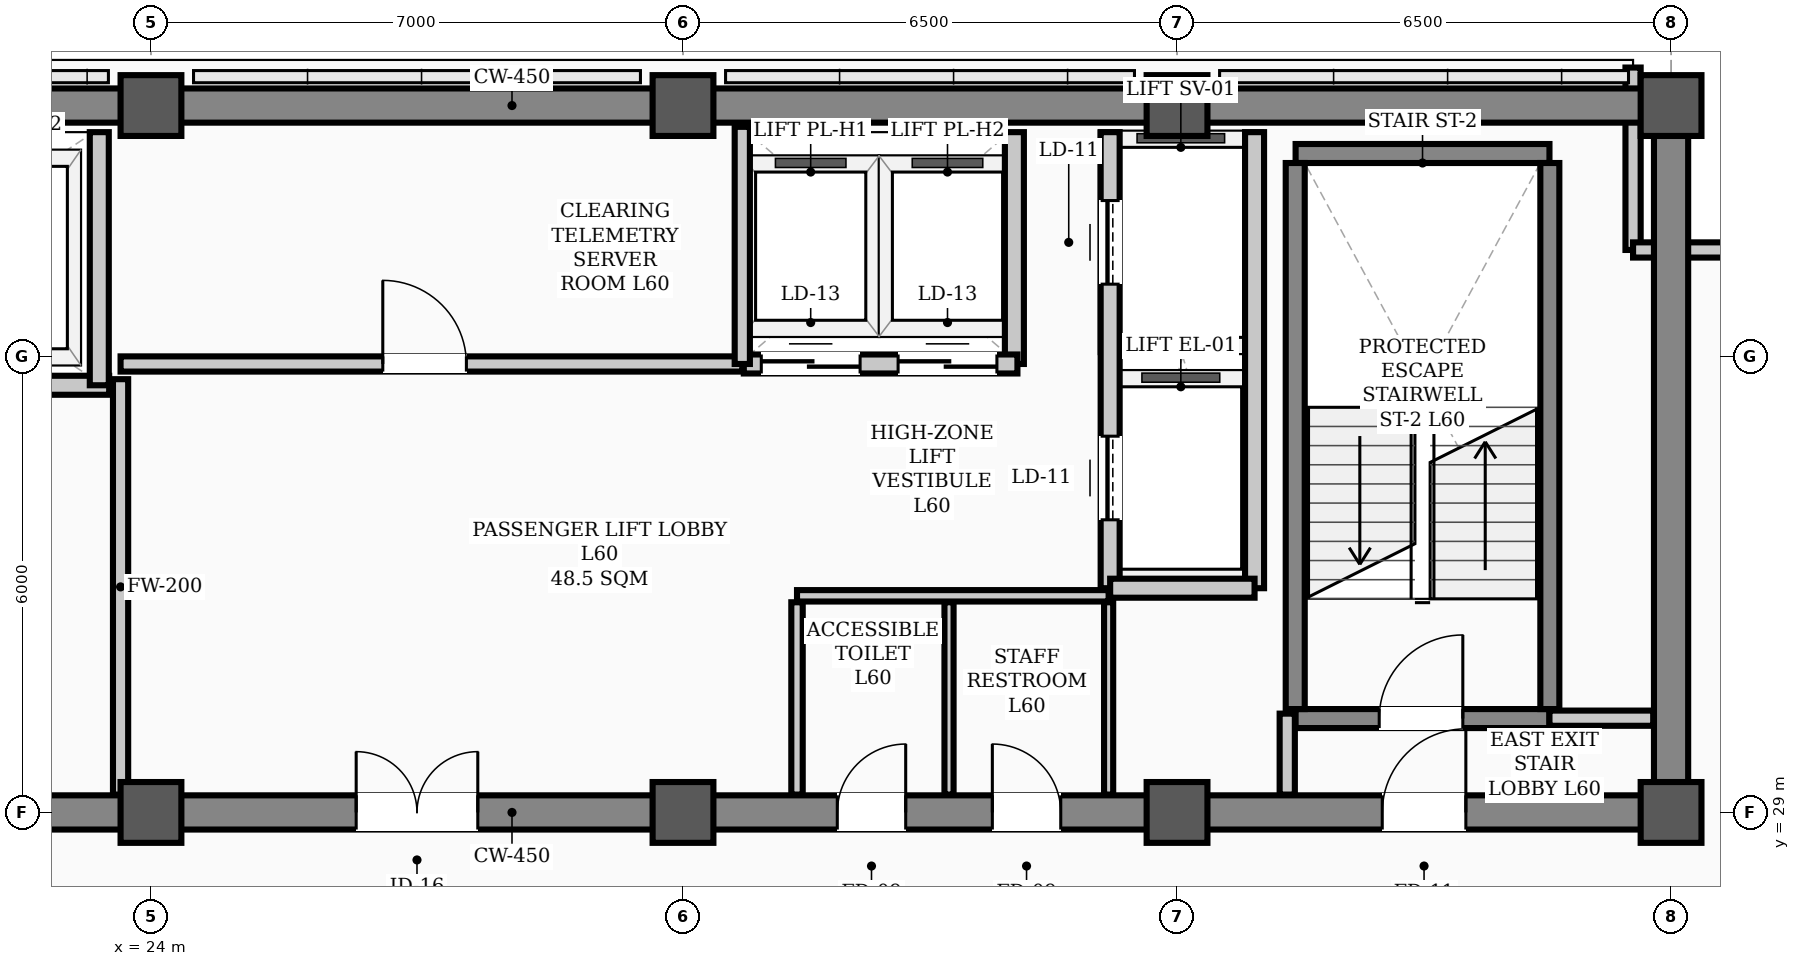
"""IFC4 building model, lengths in metres.
Left out: names, types, materials, properties, quantities, classifications, styles, units other than length and angle.
Written with IfcOpenShell. Run it as: python <this file> out.ifc"""

import sys

from ifc_helpers import new_model, si_unit, direction, frame, frame_2d, origin, origin_2d, place, context, subcontext, project, spatial, rectangle, hollow_rectangle, extrude, element, fill, save


model = new_model("IFC4")
c1 = context("Model", 3, precision=1e-05, world=origin(), true_north=direction((0.0, 1.0)))
c2 = subcontext(c1, "Body", "Model", "MODEL_VIEW")
j1 = project(units=[si_unit("LENGTHUNIT", "METRE"), si_unit("PLANEANGLEUNIT", "RADIAN")], contexts=[c1])
p1 = place(None, origin())
s1 = spatial("IfcSite", under=j1, at=p1, CompositionType="ELEMENT")
p2 = place(p1, origin())
s2 = spatial("IfcBuilding", under=s1, at=p2, CompositionType="ELEMENT")
p3 = place(p2, frame((0.0, 0.0, 242.3)))
s3 = spatial("IfcBuildingStorey", under=s2, at=p3, CompositionType="ELEMENT", Elevation=242.3)
for number, where, z_axis, x_axis in (
    (1, (24.0, 29.0, 0.0), (0.0, 0.0, 1.0), (1.0, 0.0, 0.0)),
    (2, (24.0, 38.3, 0.0), (0.0, 0.0, 1.0), (1.0, 0.0, 0.0)),
    (3, (31.0, 29.0, 0.0), (0.0, 0.0, 1.0), (1.0, 0.0, 0.0)),
    (4, (31.0, 38.3, 0.0), (0.0, 0.0, 1.0), (1.0, 0.0, 0.0)),
    (5, (37.5, 29.0, 0.0), (0.0, 0.0, 1.0), (1.0, 0.0, 0.0)),
    (6, (37.5, 38.3, 0.0), (0.0, 0.0, 1.0), (1.0, 0.0, 0.0)),
    (7, (44.0, 29.0, 0.0), (0.0, 0.0, 1.0), (1.0, 0.0, 0.0)),
    (8, (44.0, 38.3, 0.0), (0.0, 0.0, 1.0), (1.0, 0.0, 0.0)),
):
    element("IfcColumn", number, at=place(p3, frame(where, z_axis=z_axis, x_axis=x_axis)), inside=s3, PredefinedType="COLUMN", context=c2, shape_type="SweptSolid", body=[
        extrude(hollow_rectangle(XDim=0.8, YDim=0.8, WallThickness=0.032, InnerFilletRadius=0.016, OuterFilletRadius=0.048, at=origin_2d()), origin(), (0.0, 0.0, 1.0), 3.9),
    ])
p4 = place(p3, frame((43.5, 38.8, 0.0), z_axis=(0.0, 0.0, 1.0), x_axis=(0.0, -1.0, 0.0)))
e9 = element("IfcWall", 9, at=p4, inside=s3, PredefinedType="PARAPET", context=c2, shape_type="SweptSolid", body=[
    extrude(rectangle(XDim=2.4, YDim=0.2, at=frame_2d((1.2, 0.0))), origin(), (0.0, 0.0, 1.0), 1.2),
])
p5 = place(p3, frame((43.5, 36.4, 0.0), z_axis=(0.0, 0.0, 1.0), x_axis=(1.0, 0.0, 0.0)))
e10 = element("IfcWall", 10, at=p5, inside=s3, PredefinedType="PARAPET", context=c2, shape_type="SweptSolid", body=[
    extrude(rectangle(XDim=2.4, YDim=0.2, at=frame_2d((1.2, 0.0))), origin(), (0.0, 0.0, 1.0), 1.2),
])
p6 = place(p3, frame((13.5, 29.0, 0.0), z_axis=(0.0, 0.0, 1.0), x_axis=(1.0, 0.0, 0.0)))
e11 = element("IfcWall", 11, at=p6, inside=s3, PredefinedType="SHEAR", context=c2, shape_type="SweptSolid", body=[
    extrude(rectangle(XDim=30.5, YDim=0.45, at=frame_2d((15.25, 0.0))), origin(), (0.0, 0.0, 1.0), 3.72),
])
p7 = place(p6, frame((1.75, 0.0, 0.0)))
e12 = element("IfcOpeningElement", 12, at=p7, cuts=e11, PredefinedType="OPENING", context=c2, shape_type="SweptSolid", body=[
    extrude(rectangle(XDim=1.1, YDim=2.08, at=frame_2d((0.55, 1.04))), frame((0.0, 0.235, 0.0), z_axis=(0.0, -1.0, 0.0), x_axis=(1.0, 0.0, 0.0)), (0.0, 0.0, 1.0), 0.47),
])
p8 = place(p6, frame((26.7, 0.0, 0.0)))
e13 = element("IfcOpeningElement", 13, at=p8, cuts=e11, PredefinedType="OPENING", context=c2, shape_type="SweptSolid", body=[
    extrude(rectangle(XDim=1.1, YDim=2.08, at=frame_2d((0.55, 1.04))), frame((0.0, 0.235, 0.0), z_axis=(0.0, -1.0, 0.0), x_axis=(1.0, 0.0, 0.0)), (0.0, 0.0, 1.0), 0.47),
])
p9 = place(p6, frame((6.8, 0.0, 0.0)))
e14 = element("IfcOpeningElement", 14, at=p9, cuts=e11, PredefinedType="OPENING", context=c2, shape_type="SweptSolid", body=[
    extrude(rectangle(XDim=1.1, YDim=2.08, at=frame_2d((0.55, 1.04))), frame((0.0, 0.235, 0.0), z_axis=(0.0, -1.0, 0.0), x_axis=(1.0, 0.0, 0.0)), (0.0, 0.0, 1.0), 0.47),
])
p10 = place(p6, frame((13.2, 0.0, 0.0)))
e15 = element("IfcOpeningElement", 15, at=p10, cuts=e11, PredefinedType="OPENING", context=c2, shape_type="SweptSolid", body=[
    extrude(rectangle(XDim=1.6, YDim=2.08, at=frame_2d((0.8, 1.04))), frame((0.0, 0.235, 0.0), z_axis=(0.0, -1.0, 0.0), x_axis=(1.0, 0.0, 0.0)), (0.0, 0.0, 1.0), 0.47),
])
p11 = place(p6, frame((19.53, 0.0, 0.0)))
e16 = element("IfcOpeningElement", 16, at=p11, cuts=e11, PredefinedType="OPENING", context=c2, shape_type="SweptSolid", body=[
    extrude(rectangle(XDim=0.9, YDim=2.08, at=frame_2d((0.45, 1.04))), frame((0.0, 0.235, 0.0), z_axis=(0.0, -1.0, 0.0), x_axis=(1.0, 0.0, 0.0)), (0.0, 0.0, 1.0), 0.47),
])
p12 = place(p6, frame((21.57, 0.0, 0.0)))
e17 = element("IfcOpeningElement", 17, at=p12, cuts=e11, PredefinedType="OPENING", context=c2, shape_type="SweptSolid", body=[
    extrude(rectangle(XDim=0.9, YDim=2.08, at=frame_2d((0.45, 1.04))), frame((0.0, 0.235, 0.0), z_axis=(0.0, -1.0, 0.0), x_axis=(1.0, 0.0, 0.0)), (0.0, 0.0, 1.0), 0.47),
])
p13 = place(p3, frame((13.5, 38.3, 0.0), z_axis=(0.0, 0.0, 1.0), x_axis=(1.0, 0.0, 0.0)))
e18 = element("IfcWall", 18, at=p13, inside=s3, PredefinedType="SHEAR", context=c2, shape_type="SweptSolid", body=[
    extrude(rectangle(XDim=30.5, YDim=0.45, at=frame_2d((15.25, 0.0))), origin(), (0.0, 0.0, 1.0), 3.72),
])
p14 = place(p3, frame((44.0, 29.35, 0.0), z_axis=(0.0, 0.0, 1.0), x_axis=(0.0, 1.0, 0.0)))
e19 = element("IfcWall", 19, at=p14, inside=s3, PredefinedType="SHEAR", context=c2, shape_type="SweptSolid", body=[
    extrude(rectangle(XDim=8.6, YDim=0.45, at=frame_2d((4.3, 0.0))), origin(), (0.0, 0.0, 1.0), 3.72),
])
p15 = place(p3, frame((39.06, 30.235, 0.0), z_axis=(0.0, 0.0, 1.0), x_axis=(1.0, 0.0, 0.0)))
e20 = element("IfcWall", 20, at=p15, inside=s3, PredefinedType="STANDARD", context=c2, shape_type="SweptSolid", body=[
    extrude(rectangle(XDim=3.34, YDim=0.25, at=frame_2d((1.67, 0.0))), origin(), (0.0, 0.0, 1.0), 3.72),
])
p16 = place(p15, frame((1.1, 0.0, 0.0)))
e21 = element("IfcOpeningElement", 21, at=p16, cuts=e20, PredefinedType="OPENING", context=c2, shape_type="SweptSolid", body=[
    extrude(rectangle(XDim=1.1, YDim=2.08, at=frame_2d((0.55, 1.04))), frame((0.0, 0.135, 0.0), z_axis=(0.0, -1.0, 0.0), x_axis=(1.0, 0.0, 0.0)), (0.0, 0.0, 1.0), 0.27),
])
p17 = place(p3, frame((39.06, 37.669, 0.0), z_axis=(0.0, 0.0, 1.0), x_axis=(1.0, 0.0, 0.0)))
e22 = element("IfcWall", 22, at=p17, inside=s3, PredefinedType="STANDARD", context=c2, shape_type="SweptSolid", body=[
    extrude(rectangle(XDim=3.34, YDim=0.25, at=frame_2d((1.67, 0.0))), origin(), (0.0, 0.0, 1.0), 3.72),
])
for number, where, z_axis, x_axis in (
    (23, (39.055, 30.36, 0.0), (0.0, 0.0, 1.0), (0.0, 1.0, 0.0)),
    (24, (42.405, 30.36, 0.0), (0.0, 0.0, 1.0), (0.0, 1.0, 0.0)),
):
    element("IfcWall", number, at=place(p3, frame(where, z_axis=z_axis, x_axis=x_axis)), inside=s3, PredefinedType="STANDARD", context=c2, shape_type="SweptSolid", body=[
        extrude(rectangle(XDim=7.184, YDim=0.25, at=frame_2d((3.592, 0.0))), origin(), (0.0, 0.0, 1.0), 3.72),
    ])
p18 = place(p3, frame((18.1, 34.62, 0.0), z_axis=(0.0, 0.0, 1.0), x_axis=(1.0, 0.0, 0.0)))
e25 = element("IfcWall", 25, at=p18, inside=s3, PredefinedType="STANDARD", context=c2, shape_type="SweptSolid", body=[
    extrude(rectangle(XDim=5.35, YDim=0.25, at=frame_2d((2.675, 0.0))), origin(), (0.0, 0.0, 1.0), 3.72),
])
p19 = place(p18, frame((0.85, 0.0, 0.0)))
e26 = element("IfcOpeningElement", 26, at=p19, cuts=e25, PredefinedType="OPENING", context=c2, shape_type="SweptSolid", body=[
    extrude(rectangle(XDim=1.1, YDim=2.08, at=frame_2d((0.55, 1.04))), frame((0.0, 0.135, 0.0), z_axis=(0.0, -1.0, 0.0), x_axis=(1.0, 0.0, 0.0)), (0.0, 0.0, 1.0), 0.27),
])
p20 = place(p18, frame((3.45, 0.0, 0.0)))
e27 = element("IfcOpeningElement", 27, at=p20, cuts=e25, PredefinedType="OPENING", context=c2, shape_type="SweptSolid", body=[
    extrude(rectangle(XDim=1.1, YDim=2.08, at=frame_2d((0.55, 1.04))), frame((0.0, 0.135, 0.0), z_axis=(0.0, -1.0, 0.0), x_axis=(1.0, 0.0, 0.0)), (0.0, 0.0, 1.0), 0.27),
])
p21 = place(p3, frame((36.62, 31.95, 0.0), z_axis=(0.0, 0.0, 1.0), x_axis=(0.0, 1.0, 0.0)))
e28 = element("IfcWall", 28, at=p21, inside=s3, PredefinedType="STANDARD", context=c2, shape_type="SweptSolid", body=[
    extrude(rectangle(XDim=6.0, YDim=0.25, at=frame_2d((3.0, 0.0))), origin(), (0.0, 0.0, 1.0), 3.72),
])
p22 = place(p21, frame((0.9, 0.0, 0.0)))
e29 = element("IfcOpeningElement", 29, at=p22, cuts=e28, PredefinedType="OPENING", context=c2, shape_type="SweptSolid", body=[
    extrude(rectangle(XDim=1.1, YDim=2.08, at=frame_2d((0.55, 1.04))), frame((0.0, 0.135, 0.0), z_axis=(0.0, -1.0, 0.0), x_axis=(1.0, 0.0, 0.0)), (0.0, 0.0, 1.0), 0.27),
])
p23 = place(p21, frame((4.0, 0.0, 0.0)))
e30 = element("IfcOpeningElement", 30, at=p23, cuts=e28, PredefinedType="OPENING", context=c2, shape_type="SweptSolid", body=[
    extrude(rectangle(XDim=1.1, YDim=2.08, at=frame_2d((0.55, 1.04))), frame((0.0, 0.135, 0.0), z_axis=(0.0, -1.0, 0.0), x_axis=(1.0, 0.0, 0.0)), (0.0, 0.0, 1.0), 0.27),
])
p24 = place(p3, frame((38.52, 31.95, 0.0), z_axis=(0.0, 0.0, 1.0), x_axis=(0.0, 1.0, 0.0)))
e31 = element("IfcWall", 31, at=p24, inside=s3, PredefinedType="STANDARD", context=c2, shape_type="SweptSolid", body=[
    extrude(rectangle(XDim=6.0, YDim=0.25, at=frame_2d((3.0, 0.0))), origin(), (0.0, 0.0, 1.0), 3.48),
])
p25 = place(p3, frame((36.62, 31.95, 0.0), z_axis=(0.0, 0.0, 1.0), x_axis=(1.0, 0.0, 0.0)))
e32 = element("IfcWall", 32, at=p25, inside=s3, PredefinedType="STANDARD", context=c2, shape_type="SweptSolid", body=[
    extrude(rectangle(XDim=1.9, YDim=0.25, at=frame_2d((0.95, 0.0))), origin(), (0.0, 0.0, 1.0), 3.48),
])
p26 = place(p3, frame((23.32, 34.62, 0.0), z_axis=(0.0, 0.0, 1.0), x_axis=(0.0, 1.0, 0.0)))
e33 = element("IfcWall", 33, at=p26, inside=s3, PredefinedType="STANDARD", context=c2, shape_type="SweptSolid", body=[
    extrude(rectangle(XDim=3.33, YDim=0.25, at=frame_2d((1.665, 0.0))), origin(), (0.0, 0.0, 1.0), 3.72),
])
p27 = place(p3, frame((35.36, 34.9, 0.0), z_axis=(0.0, 0.0, 1.0), x_axis=(0.0, 1.0, 0.0)))
e34 = element("IfcWall", 34, at=p27, inside=s3, PredefinedType="STANDARD", context=c2, shape_type="SweptSolid", body=[
    extrude(rectangle(XDim=3.05, YDim=0.25, at=frame_2d((1.525, 0.0))), origin(), (0.0, 0.0, 1.0), 3.72),
])
p28 = place(p3, frame((31.8, 34.9, 0.0), z_axis=(0.0, 0.0, 1.0), x_axis=(1.0, 0.0, 0.0)))
e35 = element("IfcWall", 35, at=p28, inside=s3, PredefinedType="STANDARD", context=c2, shape_type="SweptSolid", body=[
    extrude(rectangle(XDim=3.6, YDim=0.25, at=frame_2d((1.8, 0.0))), origin(), (0.0, 0.0, 1.0), 3.72),
])
p29 = place(p28, frame((0.23, 0.0, 0.0)))
e36 = element("IfcOpeningElement", 36, at=p29, cuts=e35, PredefinedType="OPENING", context=c2, shape_type="SweptSolid", body=[
    extrude(rectangle(XDim=1.3, YDim=2.08, at=frame_2d((0.65, 1.04))), frame((0.0, 0.135, 0.0), z_axis=(0.0, -1.0, 0.0), x_axis=(1.0, 0.0, 0.0)), (0.0, 0.0, 1.0), 0.27),
])
p30 = place(p28, frame((2.03, 0.0, 0.0)))
e37 = element("IfcOpeningElement", 37, at=p30, cuts=e35, PredefinedType="OPENING", context=c2, shape_type="SweptSolid", body=[
    extrude(rectangle(XDim=1.3, YDim=2.08, at=frame_2d((0.65, 1.04))), frame((0.0, 0.135, 0.0), z_axis=(0.0, -1.0, 0.0), x_axis=(1.0, 0.0, 0.0)), (0.0, 0.0, 1.0), 0.27),
])
p31 = place(p3, frame((42.4, 30.24, 0.0), z_axis=(0.0, 0.0, 1.0), x_axis=(1.0, 0.0, 0.0)))
e38 = element("IfcWall", 38, at=p31, inside=s3, PredefinedType="STANDARD", context=c2, shape_type="SweptSolid", body=[
    extrude(rectangle(XDim=1.365, YDim=0.2, at=frame_2d((0.683, 0.0))), origin(), (0.0, 0.0, 1.0), 3.72),
])
p32 = place(p3, frame((23.6, 34.9, 0.0), z_axis=(0.0, 0.0, 1.0), x_axis=(1.0, 0.0, 0.0)))
e39 = element("IfcWall", 39, at=p32, inside=s3, PredefinedType="STANDARD", context=c2, shape_type="SweptSolid", body=[
    extrude(rectangle(XDim=8.18, YDim=0.2, at=frame_2d((4.09, 0.0))), origin(), (0.0, 0.0, 1.0), 3.72),
])
p33 = place(p32, frame((3.45, 0.0, 0.0)))
e40 = element("IfcOpeningElement", 40, at=p33, cuts=e39, PredefinedType="OPENING", context=c2, shape_type="SweptSolid", body=[
    extrude(rectangle(XDim=1.1, YDim=2.08, at=frame_2d((0.55, 1.04))), frame((0.0, 0.11, 0.0), z_axis=(0.0, -1.0, 0.0), x_axis=(1.0, 0.0, 0.0)), (0.0, 0.0, 1.0), 0.22),
])
p34 = place(p3, frame((32.5, 31.85, 0.0), z_axis=(0.0, 0.0, 1.0), x_axis=(1.0, 0.0, 0.0)))
e41 = element("IfcWall", 41, at=p34, inside=s3, PredefinedType="PARTITIONING", context=c2, shape_type="SweptSolid", body=[
    extrude(rectangle(XDim=4.1, YDim=0.15, at=frame_2d((2.05, 0.0))), origin(), (0.0, 0.0, 1.0), 3.72),
])
p35 = place(p3, frame((38.95, 29.235, 0.0), z_axis=(0.0, 0.0, 1.0), x_axis=(0.0, 1.0, 0.0)))
e42 = element("IfcWall", 42, at=p35, inside=s3, PredefinedType="STANDARD", context=c2, shape_type="SweptSolid", body=[
    extrude(rectangle(XDim=1.065, YDim=0.2, at=frame_2d((0.532, 0.0))), origin(), (0.0, 0.0, 1.0), 3.72),
])
p36 = place(p3, frame((23.6, 29.235, 0.0), z_axis=(0.0, 0.0, 1.0), x_axis=(0.0, 1.0, 0.0)))
e43 = element("IfcWall", 43, at=p36, inside=s3, PredefinedType="STANDARD", context=c2, shape_type="SweptSolid", body=[
    extrude(rectangle(XDim=5.465, YDim=0.2, at=frame_2d((2.732, 0.0))), origin(), (0.0, 0.0, 1.0), 3.2),
])
p37 = place(p3, frame((32.5, 29.235, 0.0), z_axis=(0.0, 0.0, 1.0), x_axis=(0.0, 1.0, 0.0)))
e44 = element("IfcWall", 44, at=p37, inside=s3, PredefinedType="PARTITIONING", context=c2, shape_type="SweptSolid", body=[
    extrude(rectangle(XDim=2.53, YDim=0.15, at=frame_2d((1.265, 0.0))), origin(), (0.0, 0.0, 1.0), 3.35),
])
for number, where, z_axis, x_axis in (
    (45, (36.6, 29.235, 0.0), (0.0, 0.0, 1.0), (0.0, 1.0, 0.0)),
    (46, (34.5, 29.235, 0.0), (0.0, 0.0, 1.0), (0.0, 1.0, 0.0)),
):
    element("IfcWall", number, at=place(p3, frame(where, z_axis=z_axis, x_axis=x_axis)), inside=s3, PredefinedType="PARTITIONING", context=c2, shape_type="SweptSolid", body=[
        extrude(rectangle(XDim=2.53, YDim=0.12, at=frame_2d((1.265, 0.0))), origin(), (0.0, 0.0, 1.0), 3.35),
    ])
p38 = place(p3, frame((31.78, 34.9, 0.0), z_axis=(0.0, 0.0, 1.0), x_axis=(0.0, 1.0, 0.0)))
e47 = element("IfcWall", 47, at=p38, inside=s3, PredefinedType="STANDARD", context=c2, shape_type="SweptSolid", body=[
    extrude(rectangle(XDim=3.12, YDim=0.2, at=frame_2d((1.56, 0.0))), origin(), (0.0, 0.0, 1.0), 3.72),
])
p39 = place(p16, origin())
e48 = element("IfcDoor", 48, at=p39, inside=s3, OperationType="SINGLE_SWING_RIGHT", PredefinedType="DOOR", context=c2, shape_type="SweptSolid", body=[
    extrude(rectangle(XDim=1.1, YDim=2.08, at=frame_2d((0.55, 1.04))), frame((0.0, 0.025, 0.0), z_axis=(0.0, -1.0, 0.0), x_axis=(1.0, 0.0, 0.0)), (0.0, 0.0, 1.0), 0.05),
])
fill(e21, e48)
p40 = place(p8, origin())
e49 = element("IfcDoor", 49, at=p40, inside=s3, OperationType="SINGLE_SWING_RIGHT", PredefinedType="DOOR", context=c2, shape_type="SweptSolid", body=[
    extrude(rectangle(XDim=1.1, YDim=2.08, at=frame_2d((0.55, 1.04))), frame((0.0, 0.025, 0.0), z_axis=(0.0, -1.0, 0.0), x_axis=(1.0, 0.0, 0.0)), (0.0, 0.0, 1.0), 0.05),
])
fill(e13, e49)
p41 = place(p10, origin())
e50 = element("IfcDoor", 50, at=p41, inside=s3, OperationType="DOUBLE_DOOR_SINGLE_SWING", PredefinedType="DOOR", context=c2, shape_type="SweptSolid", body=[
    extrude(rectangle(XDim=1.6, YDim=2.08, at=frame_2d((0.8, 1.04))), frame((0.0, 0.025, 0.0), z_axis=(0.0, -1.0, 0.0), x_axis=(1.0, 0.0, 0.0)), (0.0, 0.0, 1.0), 0.05),
])
fill(e15, e50)
p42 = place(p33, origin())
e51 = element("IfcDoor", 51, at=p42, inside=s3, OperationType="SINGLE_SWING_LEFT", PredefinedType="DOOR", context=c2, shape_type="SweptSolid", body=[
    extrude(rectangle(XDim=1.1, YDim=2.08, at=frame_2d((0.55, 1.04))), frame((0.0, 0.025, 0.0), z_axis=(0.0, -1.0, 0.0), x_axis=(1.0, 0.0, 0.0)), (0.0, 0.0, 1.0), 0.05),
])
fill(e40, e51)
p43 = place(p11, origin())
e52 = element("IfcDoor", 52, at=p43, inside=s3, OperationType="SINGLE_SWING_RIGHT", PredefinedType="DOOR", context=c2, shape_type="SweptSolid", body=[
    extrude(rectangle(XDim=0.9, YDim=2.08, at=frame_2d((0.45, 1.04))), frame((0.0, 0.025, 0.0), z_axis=(0.0, -1.0, 0.0), x_axis=(1.0, 0.0, 0.0)), (0.0, 0.0, 1.0), 0.05),
])
fill(e16, e52)
p44 = place(p12, origin())
e53 = element("IfcDoor", 53, at=p44, inside=s3, OperationType="SINGLE_SWING_LEFT", PredefinedType="DOOR", context=c2, shape_type="SweptSolid", body=[
    extrude(rectangle(XDim=0.9, YDim=2.08, at=frame_2d((0.45, 1.04))), frame((0.0, 0.025, 0.0), z_axis=(0.0, -1.0, 0.0), x_axis=(1.0, 0.0, 0.0)), (0.0, 0.0, 1.0), 0.05),
])
fill(e17, e53)
p45 = place(p22, origin())
e54 = element("IfcDoor", 54, at=p45, inside=s3, OperationType="SLIDING_TO_LEFT", PredefinedType="DOOR", context=c2, shape_type="SweptSolid", body=[
    extrude(rectangle(XDim=1.1, YDim=2.08, at=frame_2d((0.55, 1.04))), frame((0.0, 0.025, 0.0), z_axis=(0.0, -1.0, 0.0), x_axis=(1.0, 0.0, 0.0)), (0.0, 0.0, 1.0), 0.05),
])
fill(e29, e54)
p46 = place(p23, origin())
e55 = element("IfcDoor", 55, at=p46, inside=s3, OperationType="SLIDING_TO_LEFT", PredefinedType="DOOR", context=c2, shape_type="SweptSolid", body=[
    extrude(rectangle(XDim=1.1, YDim=2.08, at=frame_2d((0.55, 1.04))), frame((0.0, 0.025, 0.0), z_axis=(0.0, -1.0, 0.0), x_axis=(1.0, 0.0, 0.0)), (0.0, 0.0, 1.0), 0.05),
])
fill(e30, e55)
p47 = place(p29, origin())
e56 = element("IfcDoor", 56, at=p47, inside=s3, OperationType="DOUBLE_DOOR_SLIDING", PredefinedType="DOOR", context=c2, shape_type="SweptSolid", body=[
    extrude(rectangle(XDim=1.3, YDim=2.08, at=frame_2d((0.65, 1.04))), frame((0.0, 0.025, 0.0), z_axis=(0.0, -1.0, 0.0), x_axis=(1.0, 0.0, 0.0)), (0.0, 0.0, 1.0), 0.05),
])
fill(e36, e56)
p48 = place(p30, origin())
e57 = element("IfcDoor", 57, at=p48, inside=s3, OperationType="DOUBLE_DOOR_SLIDING", PredefinedType="DOOR", context=c2, shape_type="SweptSolid", body=[
    extrude(rectangle(XDim=1.3, YDim=2.08, at=frame_2d((0.65, 1.04))), frame((0.0, 0.025, 0.0), z_axis=(0.0, -1.0, 0.0), x_axis=(1.0, 0.0, 0.0)), (0.0, 0.0, 1.0), 0.05),
])
fill(e37, e57)
save(model, sys.argv[1])
